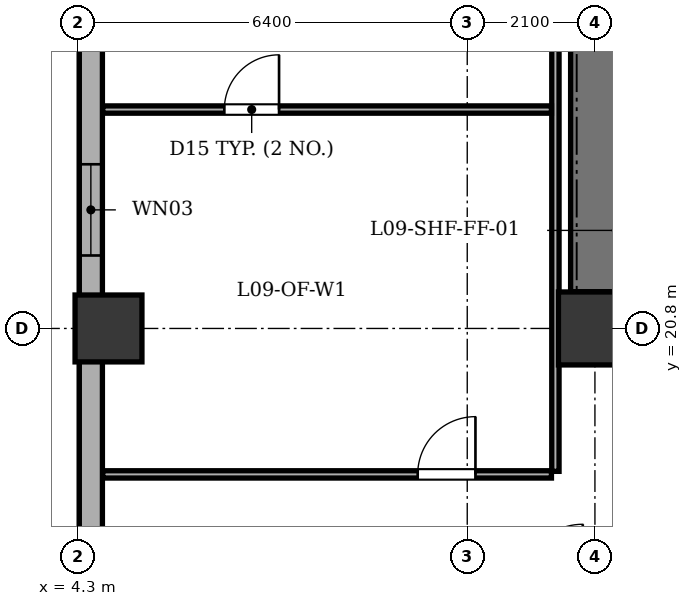
"""IFC4 building model, lengths in metres.
Left out: names, types, materials, properties, quantities, classifications, styles, units other than length and angle.
Written with IfcOpenShell. Run it as: python <this file> out.ifc"""

import sys

from ifc_helpers import new_model, si_unit, direction, frame, frame_2d, origin, origin_2d, place, context, subcontext, project, spatial, rectangle, extrude, element, fill, save


model = new_model("IFC4")
c1 = context("Model", 3, precision=1e-05, world=origin(), true_north=direction((0.0, 1.0)))
c2 = subcontext(c1, "Body", "Model", "MODEL_VIEW")
j1 = project(units=[si_unit("LENGTHUNIT", "METRE"), si_unit("PLANEANGLEUNIT", "RADIAN")], contexts=[c1])
p1 = place(None, origin())
s1 = spatial("IfcSite", under=j1, at=p1, CompositionType="ELEMENT")
p2 = place(p1, origin())
s2 = spatial("IfcBuilding", under=s1, at=p2, CompositionType="ELEMENT")
p3 = place(p2, frame((0.0, 0.0, 39.9)))
s3 = spatial("IfcBuildingStorey", under=s2, at=p3, CompositionType="ELEMENT", Elevation=39.9)
p4 = place(p3, frame((12.8, 20.8, 0.0), z_axis=(0.0, 0.0, 1.0), x_axis=(1.0, 0.0, 0.0)))
e1 = element("IfcColumn", 1, at=p4, inside=s3, PredefinedType="COLUMN", context=c2, shape_type="SweptSolid", body=[
    extrude(rectangle(XDim=1.2, YDim=1.2, at=origin_2d()), origin(), (0.0, 0.0, 1.0), 3.9),
])
p5 = place(p3, frame((4.8, 20.8, 0.0), z_axis=(0.0, 0.0, 1.0), x_axis=(1.0, 0.0, 0.0)))
e2 = element("IfcColumn", 2, at=p5, inside=s3, PredefinedType="COLUMN", context=c2, shape_type="SweptSolid", body=[
    extrude(rectangle(XDim=1.1, YDim=1.1, at=origin_2d()), origin(), (0.0, 0.0, 1.0), 3.9),
])
p6 = place(p3, frame((4.51, 6.5, 0.0), z_axis=(0.0, 0.0, 1.0), x_axis=(0.0, 1.0, 0.0)))
e3 = element("IfcWall", 3, at=p6, inside=s3, PredefinedType="STANDARD", context=c2, shape_type="SweptSolid", body=[
    extrude(rectangle(XDim=35.0, YDim=0.38, at=frame_2d((17.5, 0.0))), origin(), (0.0, 0.0, 1.0), 3.135),
])
p7 = place(p6, frame((2.693, 0.0, 0.8)))
e4 = element("IfcOpeningElement", 4, at=p7, cuts=e3, PredefinedType="OPENING", context=c2, shape_type="SweptSolid", body=[
    extrude(rectangle(XDim=1.8, YDim=1.9, at=frame_2d((0.9, 0.95))), frame((0.0, 0.2, 0.0), z_axis=(0.0, -1.0, 0.0), x_axis=(1.0, 0.0, 0.0)), (0.0, 0.0, 1.0), 0.4),
])
p8 = place(p6, frame((7.457, 0.0, 0.8)))
e5 = element("IfcOpeningElement", 5, at=p8, cuts=e3, PredefinedType="OPENING", context=c2, shape_type="SweptSolid", body=[
    extrude(rectangle(XDim=2.4, YDim=1.9, at=frame_2d((1.2, 0.95))), frame((0.0, 0.2, 0.0), z_axis=(0.0, -1.0, 0.0), x_axis=(1.0, 0.0, 0.0)), (0.0, 0.0, 1.0), 0.4),
])
p9 = place(p6, frame((15.5, 0.0, 0.8)))
e6 = element("IfcOpeningElement", 6, at=p9, cuts=e3, PredefinedType="OPENING", context=c2, shape_type="SweptSolid", body=[
    extrude(rectangle(XDim=1.5, YDim=1.9, at=frame_2d((0.75, 0.95))), frame((0.0, 0.2, 0.0), z_axis=(0.0, -1.0, 0.0), x_axis=(1.0, 0.0, 0.0)), (0.0, 0.0, 1.0), 0.4),
])
p10 = place(p6, frame((19.5, 0.0, 0.8)))
e7 = element("IfcOpeningElement", 7, at=p10, cuts=e3, PredefinedType="OPENING", context=c2, shape_type="SweptSolid", body=[
    extrude(rectangle(XDim=1.8, YDim=1.9, at=frame_2d((0.9, 0.95))), frame((0.0, 0.2, 0.0), z_axis=(0.0, -1.0, 0.0), x_axis=(1.0, 0.0, 0.0)), (0.0, 0.0, 1.0), 0.4),
])
p11 = place(p6, frame((23.95, 0.0, 0.8)))
e8 = element("IfcOpeningElement", 8, at=p11, cuts=e3, PredefinedType="OPENING", context=c2, shape_type="SweptSolid", body=[
    extrude(rectangle(XDim=1.8, YDim=1.9, at=frame_2d((0.9, 0.95))), frame((0.0, 0.2, 0.0), z_axis=(0.0, -1.0, 0.0), x_axis=(1.0, 0.0, 0.0)), (0.0, 0.0, 1.0), 0.4),
])
p12 = place(p6, frame((31.175, 0.0, 0.8)))
e9 = element("IfcOpeningElement", 9, at=p12, cuts=e3, PredefinedType="OPENING", context=c2, shape_type="SweptSolid", body=[
    extrude(rectangle(XDim=1.8, YDim=1.9, at=frame_2d((0.9, 0.95))), frame((0.0, 0.2, 0.0), z_axis=(0.0, -1.0, 0.0), x_axis=(1.0, 0.0, 0.0)), (0.0, 0.0, 1.0), 0.4),
])
p13 = place(p3, frame((12.8, 21.405, 0.0), z_axis=(0.0, 0.0, 1.0), x_axis=(0.0, 1.0, 0.0)))
e10 = element("IfcWall", 10, at=p13, inside=s3, PredefinedType="SHEAR", context=c2, shape_type="SweptSolid", body=[
    extrude(rectangle(XDim=11.59, YDim=0.8, at=frame_2d((5.795, 0.0))), origin(), (0.0, 0.0, 1.0), 3.6),
])
p14 = place(p3, frame((12.15, 18.45, 0.0), z_axis=(0.0, 0.0, 1.0), x_axis=(0.0, 1.0, 0.0)))
e11 = element("IfcWall", 11, at=p14, inside=s3, PredefinedType="PARTITIONING", context=c2, shape_type="SweptSolid", body=[
    extrude(rectangle(XDim=17.5, YDim=0.12, at=frame_2d((8.75, 0.0))), origin(), (0.0, 0.0, 1.0), 3.6),
])
p15 = place(p3, frame((4.705, 18.4, 0.0), z_axis=(0.0, 0.0, 1.0), x_axis=(1.0, 0.0, 0.0)))
e12 = element("IfcWall", 12, at=p15, inside=s3, PredefinedType="PARTITIONING", context=c2, shape_type="SweptSolid", body=[
    extrude(rectangle(XDim=7.38, YDim=0.12, at=frame_2d((3.69, 0.0))), origin(), (0.0, 0.0, 1.0), 3.6),
])
p16 = place(p15, frame((5.18, 0.0, 0.0)))
e13 = element("IfcOpeningElement", 13, at=p16, cuts=e12, PredefinedType="OPENING", context=c2, shape_type="SweptSolid", body=[
    extrude(rectangle(XDim=0.95, YDim=2.1, at=frame_2d((0.475, 1.05))), frame((0.0, 0.07, 0.0), z_axis=(0.0, -1.0, 0.0), x_axis=(1.0, 0.0, 0.0)), (0.0, 0.0, 1.0), 0.14),
])
p17 = place(p3, frame((4.705, 24.4, 0.0), z_axis=(0.0, 0.0, 1.0), x_axis=(1.0, 0.0, 0.0)))
e14 = element("IfcWall", 14, at=p17, inside=s3, PredefinedType="PARTITIONING", context=c2, shape_type="SweptSolid", body=[
    extrude(rectangle(XDim=7.38, YDim=0.12, at=frame_2d((3.69, 0.0))), origin(), (0.0, 0.0, 1.0), 3.6),
])
p18 = place(p17, frame((2.0, 0.0, 0.0)))
e15 = element("IfcOpeningElement", 15, at=p18, cuts=e14, PredefinedType="OPENING", context=c2, shape_type="SweptSolid", body=[
    extrude(rectangle(XDim=0.9, YDim=2.05, at=frame_2d((0.45, 1.025))), frame((0.0, 0.07, 0.0), z_axis=(0.0, -1.0, 0.0), x_axis=(1.0, 0.0, 0.0)), (0.0, 0.0, 1.0), 0.14),
])
p19 = place(p9, origin())
e16 = element("IfcWindow", 16, at=p19, inside=s3, PartitioningType="SINGLE_PANEL", PredefinedType="WINDOW", context=c2, shape_type="SweptSolid", body=[
    extrude(rectangle(XDim=1.5, YDim=1.9, at=frame_2d((0.75, 0.95))), frame((0.0, -0.01, 0.0), z_axis=(0.0, -1.0, 0.0), x_axis=(1.0, 0.0, 0.0)), (0.0, 0.0, 1.0), 0.06),
])
fill(e6, e16)
p20 = place(p18, origin())
e17 = element("IfcDoor", 17, at=p20, inside=s3, OperationType="SINGLE_SWING_RIGHT", PredefinedType="DOOR", context=c2, shape_type="SweptSolid", body=[
    extrude(rectangle(XDim=0.9, YDim=2.05, at=frame_2d((0.45, 1.025))), frame((0.0, 0.025, 0.0), z_axis=(0.0, -1.0, 0.0), x_axis=(1.0, 0.0, 0.0)), (0.0, 0.0, 1.0), 0.05),
])
fill(e15, e17)
p21 = place(p16, origin())
e18 = element("IfcDoor", 18, at=p21, inside=s3, OperationType="SINGLE_SWING_RIGHT", PredefinedType="DOOR", context=c2, shape_type="SweptSolid", body=[
    extrude(rectangle(XDim=0.95, YDim=2.1, at=frame_2d((0.475, 1.05))), frame((0.0, 0.025, 0.0), z_axis=(0.0, -1.0, 0.0), x_axis=(1.0, 0.0, 0.0)), (0.0, 0.0, 1.0), 0.05),
])
fill(e13, e18)
save(model, sys.argv[1])
